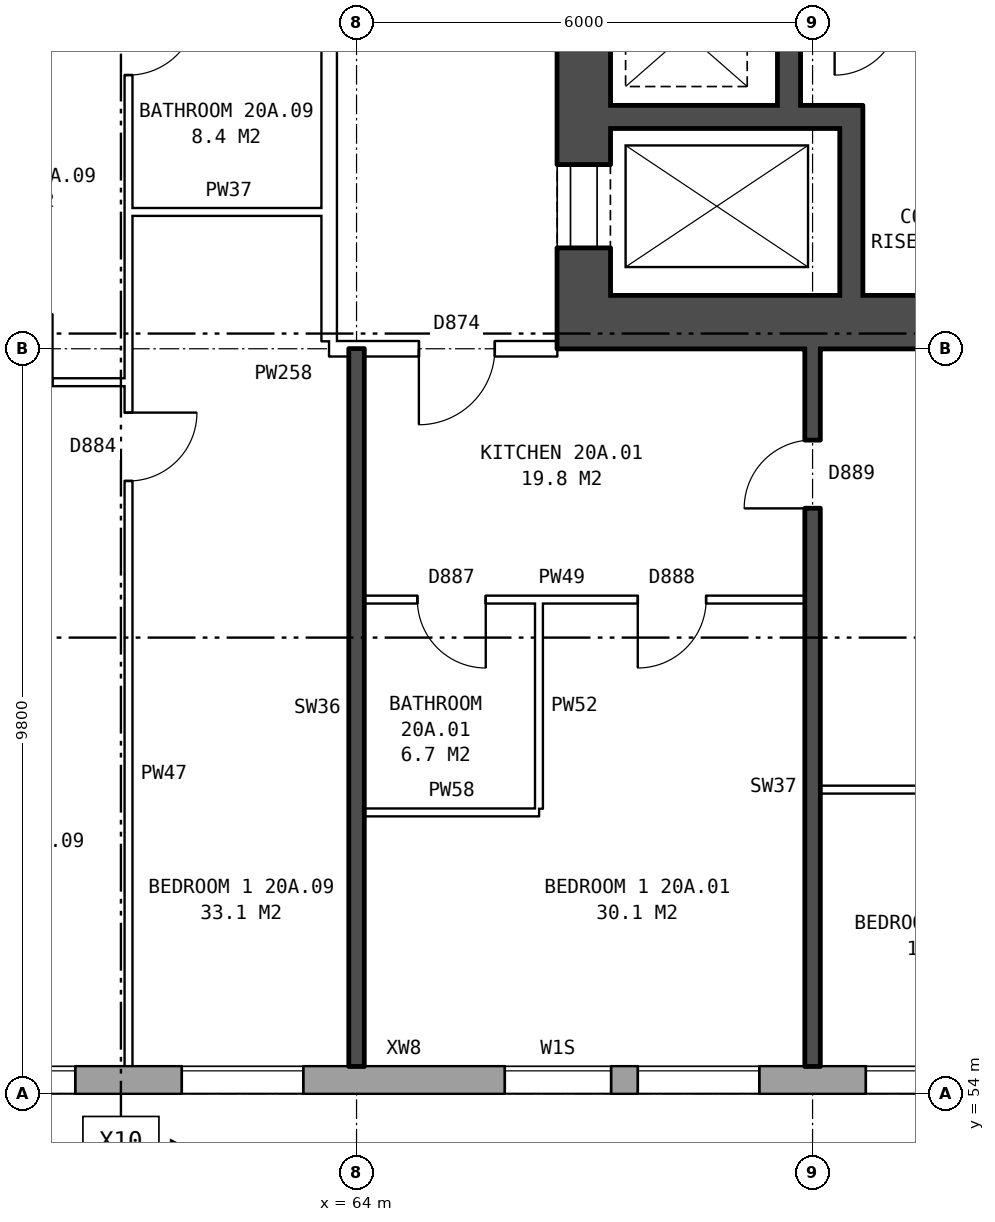
"""IFC4 building model, lengths in metres.
Left out: names, types, materials, properties, quantities, classifications, styles, units other than length and angle.
Written with IfcOpenShell. Run it as: python <this file> out.ifc"""

import sys

from ifc_helpers import new_model, si_unit, direction, frame, frame_2d, origin, place, context, subcontext, project, spatial, rectangle, extrude, element, fill, save


model = new_model("IFC4")
c1 = context("Model", 3, precision=1e-05, world=origin(), true_north=direction((0.0, 1.0)))
c2 = subcontext(c1, "Body", "Model", "MODEL_VIEW")
j1 = project(units=[si_unit("LENGTHUNIT", "METRE"), si_unit("PLANEANGLEUNIT", "RADIAN")], contexts=[c1])
p1 = place(None, origin())
s1 = spatial("IfcSite", under=j1, at=p1, CompositionType="ELEMENT")
p2 = place(p1, origin())
s2 = spatial("IfcBuilding", under=s1, at=p2, CompositionType="ELEMENT")
p3 = place(p2, frame((0.0, 0.0, 74.7)))
s3 = spatial("IfcBuildingStorey", under=s2, at=p3, CompositionType="ELEMENT", Elevation=74.7)
p4 = place(p3, frame((26.325, 54.18, 0.0), z_axis=(0.0, 0.0, 1.0), x_axis=(1.0, 0.0, 0.0)))
e1 = element("IfcWall", 1, at=p4, inside=s3, PredefinedType="STANDARD", context=c2, shape_type="SweptSolid", body=[
    extrude(rectangle(XDim=46.601, YDim=0.36, at=frame_2d((23.3, 0.0))), origin(), (0.0, 0.0, 1.0), 2.85),
])
p5 = place(p4, frame((2.375, 0.0, 0.8)))
e2 = element("IfcOpeningElement", 2, at=p5, cuts=e1, PredefinedType="OPENING", context=c2, shape_type="SweptSolid", body=[
    extrude(rectangle(XDim=1.6, YDim=1.8, at=frame_2d((0.8, 0.9))), frame((0.0, 0.19, 0.0), z_axis=(0.0, -1.0, 0.0), x_axis=(1.0, 0.0, 0.0)), (0.0, 0.0, 1.0), 0.38),
])
p6 = place(p4, frame((4.275, 0.0, 0.8)))
e3 = element("IfcOpeningElement", 3, at=p6, cuts=e1, PredefinedType="OPENING", context=c2, shape_type="SweptSolid", body=[
    extrude(rectangle(XDim=1.6, YDim=1.8, at=frame_2d((0.8, 0.9))), frame((0.0, 0.19, 0.0), z_axis=(0.0, -1.0, 0.0), x_axis=(1.0, 0.0, 0.0)), (0.0, 0.0, 1.0), 0.38),
])
p7 = place(p4, frame((8.275, 0.0, 0.8)))
e4 = element("IfcOpeningElement", 4, at=p7, cuts=e1, PredefinedType="OPENING", context=c2, shape_type="SweptSolid", body=[
    extrude(rectangle(XDim=0.8, YDim=0.9, at=frame_2d((0.4, 0.45))), frame((0.0, 0.19, 0.0), z_axis=(0.0, -1.0, 0.0), x_axis=(1.0, 0.0, 0.0)), (0.0, 0.0, 1.0), 0.38),
])
p8 = place(p4, frame((11.375, 0.0, 0.8)))
e5 = element("IfcOpeningElement", 5, at=p8, cuts=e1, PredefinedType="OPENING", context=c2, shape_type="SweptSolid", body=[
    extrude(rectangle(XDim=1.6, YDim=1.8, at=frame_2d((0.8, 0.9))), frame((0.0, 0.19, 0.0), z_axis=(0.0, -1.0, 0.0), x_axis=(1.0, 0.0, 0.0)), (0.0, 0.0, 1.0), 0.38),
])
p9 = place(p4, frame((14.375, 0.0, 0.8)))
e6 = element("IfcOpeningElement", 6, at=p9, cuts=e1, PredefinedType="OPENING", context=c2, shape_type="SweptSolid", body=[
    extrude(rectangle(XDim=1.6, YDim=1.8, at=frame_2d((0.8, 0.9))), frame((0.0, 0.19, 0.0), z_axis=(0.0, -1.0, 0.0), x_axis=(1.0, 0.0, 0.0)), (0.0, 0.0, 1.0), 0.38),
])
p10 = place(p4, frame((17.375, 0.0, 0.8)))
e7 = element("IfcOpeningElement", 7, at=p10, cuts=e1, PredefinedType="OPENING", context=c2, shape_type="SweptSolid", body=[
    extrude(rectangle(XDim=1.6, YDim=1.8, at=frame_2d((0.8, 0.9))), frame((0.0, 0.19, 0.0), z_axis=(0.0, -1.0, 0.0), x_axis=(1.0, 0.0, 0.0)), (0.0, 0.0, 1.0), 0.38),
])
p11 = place(p4, frame((20.375, 0.0, 0.8)))
e8 = element("IfcOpeningElement", 8, at=p11, cuts=e1, PredefinedType="OPENING", context=c2, shape_type="SweptSolid", body=[
    extrude(rectangle(XDim=1.6, YDim=1.8, at=frame_2d((0.8, 0.9))), frame((0.0, 0.19, 0.0), z_axis=(0.0, -1.0, 0.0), x_axis=(1.0, 0.0, 0.0)), (0.0, 0.0, 1.0), 0.38),
])
p12 = place(p4, frame((23.375, 0.0, 0.8)))
e9 = element("IfcOpeningElement", 9, at=p12, cuts=e1, PredefinedType="OPENING", context=c2, shape_type="SweptSolid", body=[
    extrude(rectangle(XDim=1.6, YDim=1.8, at=frame_2d((0.8, 0.9))), frame((0.0, 0.19, 0.0), z_axis=(0.0, -1.0, 0.0), x_axis=(1.0, 0.0, 0.0)), (0.0, 0.0, 1.0), 0.38),
])
p13 = place(p4, frame((26.375, 0.0, 0.8)))
e10 = element("IfcOpeningElement", 10, at=p13, cuts=e1, PredefinedType="OPENING", context=c2, shape_type="SweptSolid", body=[
    extrude(rectangle(XDim=1.6, YDim=1.8, at=frame_2d((0.8, 0.9))), frame((0.0, 0.19, 0.0), z_axis=(0.0, -1.0, 0.0), x_axis=(1.0, 0.0, 0.0)), (0.0, 0.0, 1.0), 0.38),
])
p14 = place(p4, frame((29.375, 0.0, 0.8)))
e11 = element("IfcOpeningElement", 11, at=p14, cuts=e1, PredefinedType="OPENING", context=c2, shape_type="SweptSolid", body=[
    extrude(rectangle(XDim=1.6, YDim=1.8, at=frame_2d((0.8, 0.9))), frame((0.0, 0.19, 0.0), z_axis=(0.0, -1.0, 0.0), x_axis=(1.0, 0.0, 0.0)), (0.0, 0.0, 1.0), 0.38),
])
p15 = place(p4, frame((32.375, 0.0, 0.8)))
e12 = element("IfcOpeningElement", 12, at=p15, cuts=e1, PredefinedType="OPENING", context=c2, shape_type="SweptSolid", body=[
    extrude(rectangle(XDim=1.6, YDim=1.8, at=frame_2d((0.8, 0.9))), frame((0.0, 0.19, 0.0), z_axis=(0.0, -1.0, 0.0), x_axis=(1.0, 0.0, 0.0)), (0.0, 0.0, 1.0), 0.38),
])
p16 = place(p4, frame((35.375, 0.0, 0.8)))
e13 = element("IfcOpeningElement", 13, at=p16, cuts=e1, PredefinedType="OPENING", context=c2, shape_type="SweptSolid", body=[
    extrude(rectangle(XDim=1.6, YDim=1.8, at=frame_2d((0.8, 0.9))), frame((0.0, 0.19, 0.0), z_axis=(0.0, -1.0, 0.0), x_axis=(1.0, 0.0, 0.0)), (0.0, 0.0, 1.0), 0.38),
])
p17 = place(p4, frame((39.625, 0.0, 1.7)))
e14 = element("IfcOpeningElement", 14, at=p17, cuts=e1, PredefinedType="OPENING", context=c2, shape_type="SweptSolid", body=[
    extrude(rectangle(XDim=1.4, YDim=0.9, at=frame_2d((0.7, 0.45))), frame((0.0, 0.19, 0.0), z_axis=(0.0, -1.0, 0.0), x_axis=(1.0, 0.0, 0.0)), (0.0, 0.0, 1.0), 0.38),
])
p18 = place(p4, frame((41.375, 0.0, 0.8)))
e15 = element("IfcOpeningElement", 15, at=p18, cuts=e1, PredefinedType="OPENING", context=c2, shape_type="SweptSolid", body=[
    extrude(rectangle(XDim=1.6, YDim=1.8, at=frame_2d((0.8, 0.9))), frame((0.0, 0.19, 0.0), z_axis=(0.0, -1.0, 0.0), x_axis=(1.0, 0.0, 0.0)), (0.0, 0.0, 1.0), 0.38),
])
p19 = place(p4, frame((44.375, 0.0, 0.8)))
e16 = element("IfcOpeningElement", 16, at=p19, cuts=e1, PredefinedType="OPENING", context=c2, shape_type="SweptSolid", body=[
    extrude(rectangle(XDim=1.6, YDim=1.8, at=frame_2d((0.8, 0.9))), frame((0.0, 0.19, 0.0), z_axis=(0.0, -1.0, 0.0), x_axis=(1.0, 0.0, 0.0)), (0.0, 0.0, 1.0), 0.38),
])
p20 = place(p4, frame((6.175, 0.0, 1.7)))
e17 = element("IfcOpeningElement", 17, at=p20, cuts=e1, PredefinedType="OPENING", context=c2, shape_type="SweptSolid", body=[
    extrude(rectangle(XDim=0.8, YDim=0.9, at=frame_2d((0.4, 0.45))), frame((0.0, 0.19, 0.0), z_axis=(0.0, -1.0, 0.0), x_axis=(1.0, 0.0, 0.0)), (0.0, 0.0, 1.0), 0.38),
])
p21 = place(p4, frame((9.375, 0.0, 0.8)))
e18 = element("IfcOpeningElement", 18, at=p21, cuts=e1, PredefinedType="OPENING", context=c2, shape_type="SweptSolid", body=[
    extrude(rectangle(XDim=1.0, YDim=1.8, at=frame_2d((0.5, 0.9))), frame((0.0, 0.19, 0.0), z_axis=(0.0, -1.0, 0.0), x_axis=(1.0, 0.0, 0.0)), (0.0, 0.0, 1.0), 0.38),
])
p22 = place(p3, frame((66.99, 64.5, 0.0), z_axis=(0.0, 0.0, 1.0), x_axis=(0.0, 1.0, 0.0)))
e19 = element("IfcWall", 19, at=p22, inside=s3, PredefinedType="SHEAR", context=c2, shape_type="SweptSolid", body=[
    extrude(rectangle(XDim=11.0, YDim=0.7, at=frame_2d((5.5, 0.0))), origin(), (0.0, 0.0, 1.0), 2.85),
])
p23 = place(p22, frame((0.625, 0.0, 0.0)))
e20 = element("IfcOpeningElement", 20, at=p23, cuts=e19, PredefinedType="OPENING", context=c2, shape_type="SweptSolid", body=[
    extrude(rectangle(XDim=1.1, YDim=2.1, at=frame_2d((0.55, 1.05))), frame((0.0, 0.36, 0.0), z_axis=(0.0, -1.0, 0.0), x_axis=(1.0, 0.0, 0.0)), (0.0, 0.0, 1.0), 0.72),
])
p24 = place(p22, frame((9.2, 0.0, 0.0)))
e21 = element("IfcOpeningElement", 21, at=p24, cuts=e19, PredefinedType="OPENING", context=c2, shape_type="SweptSolid", body=[
    extrude(rectangle(XDim=1.1, YDim=2.1, at=frame_2d((0.55, 1.05))), frame((0.0, 0.36, 0.0), z_axis=(0.0, -1.0, 0.0), x_axis=(1.0, 0.0, 0.0)), (0.0, 0.0, 1.0), 0.72),
])
p25 = place(p3, frame((66.64, 64.15, 0.0), z_axis=(0.0, 0.0, 1.0), x_axis=(1.0, 0.0, 0.0)))
e22 = element("IfcWall", 22, at=p25, inside=s3, PredefinedType="SHEAR", context=c2, shape_type="SweptSolid", body=[
    extrude(rectangle(XDim=9.0, YDim=0.7, at=frame_2d((4.5, 0.0))), origin(), (0.0, 0.0, 1.0), 2.85),
])
p26 = place(p3, frame((67.34, 66.85, 0.0), z_axis=(0.0, 0.0, 1.0), x_axis=(1.0, 0.0, 0.0)))
e23 = element("IfcWall", 23, at=p26, inside=s3, PredefinedType="SHEAR", context=c2, shape_type="SweptSolid", body=[
    extrude(rectangle(XDim=3.32, YDim=0.3, at=frame_2d((1.66, 0.0))), origin(), (0.0, 0.0, 1.0), 2.85),
])
p27 = place(p3, frame((69.69, 67.0, 0.0), z_axis=(0.0, 0.0, 1.0), x_axis=(0.0, 1.0, 0.0)))
e24 = element("IfcWall", 24, at=p27, inside=s3, PredefinedType="SHEAR", context=c2, shape_type="SweptSolid", body=[
    extrude(rectangle(XDim=6.6, YDim=0.3, at=frame_2d((3.3, 0.0))), origin(), (0.0, 0.0, 1.0), 2.85),
])
p28 = place(p3, frame((70.51, 64.5, 0.0), z_axis=(0.0, 0.0, 1.0), x_axis=(0.0, 1.0, 0.0)))
e25 = element("IfcWall", 25, at=p28, inside=s3, PredefinedType="SHEAR", context=c2, shape_type="SweptSolid", body=[
    extrude(rectangle(XDim=2.2, YDim=0.3, at=frame_2d((1.1, 0.0))), origin(), (0.0, 0.0, 1.0), 2.85),
])
p29 = place(p3, frame((63.64, 63.9, 0.0), z_axis=(0.0, 0.0, 1.0), x_axis=(0.0, 1.0, 0.0)))
e26 = element("IfcWall", 26, at=p29, inside=s3, PredefinedType="PARTITIONING", context=c2, shape_type="SweptSolid", body=[
    extrude(rectangle(XDim=12.2, YDim=0.2, at=frame_2d((6.1, 0.0))), origin(), (0.0, 0.0, 1.0), 2.85),
])
p30 = place(p29, frame((5.1, 0.0, 0.0)))
e27 = element("IfcOpeningElement", 27, at=p30, cuts=e26, PredefinedType="OPENING", context=c2, shape_type="SweptSolid", body=[
    extrude(rectangle(XDim=2.0, YDim=2.1, at=frame_2d((1.0, 1.05))), frame((0.0, 0.11, 0.0), z_axis=(0.0, -1.0, 0.0), x_axis=(1.0, 0.0, 0.0)), (0.0, 0.0, 1.0), 0.22),
])
p31 = place(p3, frame((64.1, 57.7, 0.0), z_axis=(0.0, 0.0, 1.0), x_axis=(1.0, 0.0, 0.0)))
e28 = element("IfcWall", 28, at=p31, inside=s3, PredefinedType="PARTITIONING", context=c2, shape_type="SweptSolid", body=[
    extrude(rectangle(XDim=2.3, YDim=0.1, at=frame_2d((1.15, 0.0))), origin(), (0.0, 0.0, 1.0), 2.85),
])
p32 = place(p3, frame((70.1, 58.0, 0.0), z_axis=(0.0, 0.0, 1.0), x_axis=(1.0, 0.0, 0.0)))
e29 = element("IfcWall", 29, at=p32, inside=s3, PredefinedType="PARTITIONING", context=c2, shape_type="SweptSolid", body=[
    extrude(rectangle(XDim=5.54, YDim=0.1, at=frame_2d((2.77, 0.0))), origin(), (0.0, 0.0, 1.0), 2.85),
])
p33 = place(p32, frame((2.32, 0.0, 0.0)))
e30 = element("IfcOpeningElement", 30, at=p33, cuts=e29, PredefinedType="OPENING", context=c2, shape_type="SweptSolid", body=[
    extrude(rectangle(XDim=0.9, YDim=2.1, at=frame_2d((0.45, 1.05))), frame((0.0, 0.06, 0.0), z_axis=(0.0, -1.0, 0.0), x_axis=(1.0, 0.0, 0.0)), (0.0, 0.0, 1.0), 0.12),
])
p34 = place(p3, frame((64.1, 60.5, 0.0), z_axis=(0.0, 0.0, 1.0), x_axis=(1.0, 0.0, 0.0)))
e31 = element("IfcWall", 31, at=p34, inside=s3, PredefinedType="PARTITIONING", context=c2, shape_type="SweptSolid", body=[
    extrude(rectangle(XDim=5.8, YDim=0.1, at=frame_2d((2.9, 0.0))), origin(), (0.0, 0.0, 1.0), 2.85),
])
p35 = place(p34, frame((3.6, 0.0, 0.0)))
e32 = element("IfcOpeningElement", 32, at=p35, cuts=e31, PredefinedType="OPENING", context=c2, shape_type="SweptSolid", body=[
    extrude(rectangle(XDim=0.9, YDim=2.1, at=frame_2d((0.45, 1.05))), frame((0.0, 0.06, 0.0), z_axis=(0.0, -1.0, 0.0), x_axis=(1.0, 0.0, 0.0)), (0.0, 0.0, 1.0), 0.12),
])
p36 = place(p34, frame((0.7, 0.0, 0.0)))
e33 = element("IfcOpeningElement", 33, at=p36, cuts=e31, PredefinedType="OPENING", context=c2, shape_type="SweptSolid", body=[
    extrude(rectangle(XDim=0.9, YDim=2.1, at=frame_2d((0.45, 1.05))), frame((0.0, 0.06, 0.0), z_axis=(0.0, -1.0, 0.0), x_axis=(1.0, 0.0, 0.0)), (0.0, 0.0, 1.0), 0.12),
])
p37 = place(p3, frame((58.1, 63.36, 0.0), z_axis=(0.0, 0.0, 1.0), x_axis=(1.0, 0.0, 0.0)))
e34 = element("IfcWall", 34, at=p37, inside=s3, PredefinedType="PARTITIONING", context=c2, shape_type="SweptSolid", body=[
    extrude(rectangle(XDim=2.9, YDim=0.1, at=frame_2d((1.45, 0.0))), origin(), (0.0, 0.0, 1.0), 2.85),
])
p38 = place(p37, frame((1.0, 0.0, 0.0)))
e35 = element("IfcOpeningElement", 35, at=p38, cuts=e34, PredefinedType="OPENING", context=c2, shape_type="SweptSolid", body=[
    extrude(rectangle(XDim=0.9, YDim=2.1, at=frame_2d((0.45, 1.05))), frame((0.0, 0.06, 0.0), z_axis=(0.0, -1.0, 0.0), x_axis=(1.0, 0.0, 0.0)), (0.0, 0.0, 1.0), 0.12),
])
p39 = place(p3, frame((63.64, 63.8, 0.0), z_axis=(0.0, 0.0, 1.0), x_axis=(1.0, 0.0, 0.0)))
e36 = element("IfcWall", 36, at=p39, inside=s3, PredefinedType="PARTITIONING", context=c2, shape_type="SweptSolid", body=[
    extrude(rectangle(XDim=3.0, YDim=0.2, at=frame_2d((1.5, 0.0))), origin(), (0.0, 0.0, 1.0), 2.85),
])
p40 = place(p39, frame((1.18, 0.0, 0.0)))
e37 = element("IfcOpeningElement", 37, at=p40, cuts=e36, PredefinedType="OPENING", context=c2, shape_type="SweptSolid", body=[
    extrude(rectangle(XDim=1.0, YDim=2.1, at=frame_2d((0.5, 1.05))), frame((0.0, 0.11, 0.0), z_axis=(0.0, -1.0, 0.0), x_axis=(1.0, 0.0, 0.0)), (0.0, 0.0, 1.0), 0.22),
])
p41 = place(p3, frame((61.0, 65.6, 0.0), z_axis=(0.0, 0.0, 1.0), x_axis=(1.0, 0.0, 0.0)))
e38 = element("IfcWall", 38, at=p41, inside=s3, PredefinedType="PARTITIONING", context=c2, shape_type="SweptSolid", body=[
    extrude(rectangle(XDim=2.64, YDim=0.1, at=frame_2d((1.32, 0.0))), origin(), (0.0, 0.0, 1.0), 2.85),
])
p42 = place(p3, frame((61.0, 54.36, 0.0), z_axis=(0.0, 0.0, 1.0), x_axis=(0.0, 1.0, 0.0)))
e39 = element("IfcWall", 39, at=p42, inside=s3, PredefinedType="PARTITIONING", context=c2, shape_type="SweptSolid", body=[
    extrude(rectangle(XDim=14.34, YDim=0.1, at=frame_2d((7.17, 0.0))), origin(), (0.0, 0.0, 1.0), 2.85),
])
p43 = place(p42, frame((7.7, 0.0, 0.0)))
e40 = element("IfcOpeningElement", 40, at=p43, cuts=e39, PredefinedType="OPENING", context=c2, shape_type="SweptSolid", body=[
    extrude(rectangle(XDim=0.9, YDim=2.1, at=frame_2d((0.45, 1.05))), frame((0.0, 0.06, 0.0), z_axis=(0.0, -1.0, 0.0), x_axis=(1.0, 0.0, 0.0)), (0.0, 0.0, 1.0), 0.12),
])
p44 = place(p42, frame((13.04, 0.0, 0.0)))
e41 = element("IfcOpeningElement", 41, at=p44, cuts=e39, PredefinedType="OPENING", context=c2, shape_type="SweptSolid", body=[
    extrude(rectangle(XDim=0.9, YDim=2.1, at=frame_2d((0.45, 1.05))), frame((0.0, 0.06, 0.0), z_axis=(0.0, -1.0, 0.0), x_axis=(1.0, 0.0, 0.0)), (0.0, 0.0, 1.0), 0.12),
])
p45 = place(p3, frame((64.0, 54.36, 0.0), z_axis=(0.0, 0.0, 1.0), x_axis=(0.0, 1.0, 0.0)))
e42 = element("IfcWall", 42, at=p45, inside=s3, PredefinedType="SOLIDWALL", context=c2, shape_type="SweptSolid", body=[
    extrude(rectangle(XDim=9.44, YDim=0.2, at=frame_2d((4.72, 0.0))), origin(), (0.0, 0.0, 1.0), 2.85),
])
p46 = place(p3, frame((66.4, 57.75, 0.0), z_axis=(0.0, 0.0, 1.0), x_axis=(0.0, 1.0, 0.0)))
e43 = element("IfcWall", 43, at=p46, inside=s3, PredefinedType="PARTITIONING", context=c2, shape_type="SweptSolid", body=[
    extrude(rectangle(XDim=2.7, YDim=0.1, at=frame_2d((1.35, 0.0))), origin(), (0.0, 0.0, 1.0), 2.85),
])
p47 = place(p3, frame((70.0, 54.36, 0.0), z_axis=(0.0, 0.0, 1.0), x_axis=(0.0, 1.0, 0.0)))
e44 = element("IfcWall", 44, at=p47, inside=s3, PredefinedType="SOLIDWALL", context=c2, shape_type="SweptSolid", body=[
    extrude(rectangle(XDim=9.44, YDim=0.2, at=frame_2d((4.72, 0.0))), origin(), (0.0, 0.0, 1.0), 2.85),
])
p48 = place(p47, frame((7.34, 0.0, 0.0)))
e45 = element("IfcOpeningElement", 45, at=p48, cuts=e44, PredefinedType="OPENING", context=c2, shape_type="SweptSolid", body=[
    extrude(rectangle(XDim=0.9, YDim=2.1, at=frame_2d((0.45, 1.05))), frame((0.0, 0.11, 0.0), z_axis=(0.0, -1.0, 0.0), x_axis=(1.0, 0.0, 0.0)), (0.0, 0.0, 1.0), 0.22),
])
p49 = place(p15, origin())
e46 = element("IfcWindow", 46, at=p49, inside=s3, PartitioningType="SINGLE_PANEL", PredefinedType="WINDOW", context=c2, shape_type="SweptSolid", body=[
    extrude(rectangle(XDim=1.6, YDim=1.8, at=frame_2d((0.8, 0.9))), frame((0.0, 0.15, 0.0), z_axis=(0.0, -1.0, 0.0), x_axis=(1.0, 0.0, 0.0)), (0.0, 0.0, 1.0), 0.06),
])
fill(e12, e46)
p50 = place(p16, origin())
e47 = element("IfcWindow", 47, at=p50, inside=s3, PartitioningType="SINGLE_PANEL", PredefinedType="WINDOW", context=c2, shape_type="SweptSolid", body=[
    extrude(rectangle(XDim=1.6, YDim=1.8, at=frame_2d((0.8, 0.9))), frame((0.0, 0.15, 0.0), z_axis=(0.0, -1.0, 0.0), x_axis=(1.0, 0.0, 0.0)), (0.0, 0.0, 1.0), 0.06),
])
fill(e13, e47)
p51 = place(p17, origin())
e48 = element("IfcWindow", 48, at=p51, inside=s3, PartitioningType="SINGLE_PANEL", PredefinedType="WINDOW", context=c2, shape_type="SweptSolid", body=[
    extrude(rectangle(XDim=1.4, YDim=0.9, at=frame_2d((0.7, 0.45))), frame((0.0, 0.15, 0.0), z_axis=(0.0, -1.0, 0.0), x_axis=(1.0, 0.0, 0.0)), (0.0, 0.0, 1.0), 0.06),
])
fill(e14, e48)
p52 = place(p18, origin())
e49 = element("IfcWindow", 49, at=p52, inside=s3, PartitioningType="SINGLE_PANEL", PredefinedType="WINDOW", context=c2, shape_type="SweptSolid", body=[
    extrude(rectangle(XDim=1.6, YDim=1.8, at=frame_2d((0.8, 0.9))), frame((0.0, 0.15, 0.0), z_axis=(0.0, -1.0, 0.0), x_axis=(1.0, 0.0, 0.0)), (0.0, 0.0, 1.0), 0.06),
])
fill(e15, e49)
p53 = place(p19, origin())
e50 = element("IfcWindow", 50, at=p53, inside=s3, PartitioningType="SINGLE_PANEL", PredefinedType="WINDOW", context=c2, shape_type="SweptSolid", body=[
    extrude(rectangle(XDim=1.6, YDim=1.8, at=frame_2d((0.8, 0.9))), frame((0.0, 0.15, 0.0), z_axis=(0.0, -1.0, 0.0), x_axis=(1.0, 0.0, 0.0)), (0.0, 0.0, 1.0), 0.06),
])
fill(e16, e50)
p54 = place(p23, origin())
e51 = element("IfcDoor", 51, at=p54, inside=s3, OperationType="DOUBLE_DOOR_SLIDING", PredefinedType="DOOR", context=c2, shape_type="SweptSolid", body=[
    extrude(rectangle(XDim=1.1, YDim=2.1, at=frame_2d((0.55, 1.05))), frame((0.0, -0.285, 0.0), z_axis=(0.0, -1.0, 0.0), x_axis=(1.0, 0.0, 0.0)), (0.0, 0.0, 1.0), 0.05),
])
fill(e20, e51)
p55 = place(p35, frame((0.9, 0.0, 0.0), z_axis=(0.0, 0.0, 1.0), x_axis=(-1.0, 0.0, 0.0)))
e52 = element("IfcDoor", 52, at=p55, inside=s3, OperationType="SINGLE_SWING_RIGHT", PredefinedType="DOOR", context=c2, shape_type="SweptSolid", body=[
    extrude(rectangle(XDim=0.9, YDim=2.1, at=frame_2d((0.45, 1.05))), frame((0.0, 0.025, 0.0), z_axis=(0.0, -1.0, 0.0), x_axis=(1.0, 0.0, 0.0)), (0.0, 0.0, 1.0), 0.05),
])
fill(e32, e52)
p56 = place(p40, frame((1.0, 0.0, 0.0), z_axis=(0.0, 0.0, 1.0), x_axis=(-1.0, 0.0, 0.0)))
e53 = element("IfcDoor", 53, at=p56, inside=s3, OperationType="SINGLE_SWING_RIGHT", PredefinedType="DOOR", context=c2, shape_type="SweptSolid", body=[
    extrude(rectangle(XDim=1.0, YDim=2.1, at=frame_2d((0.5, 1.05))), frame((0.0, 0.025, 0.0), z_axis=(0.0, -1.0, 0.0), x_axis=(1.0, 0.0, 0.0)), (0.0, 0.0, 1.0), 0.05),
])
fill(e37, e53)
p57 = place(p48, origin())
e54 = element("IfcDoor", 54, at=p57, inside=s3, OperationType="SINGLE_SWING_LEFT", PredefinedType="DOOR", context=c2, shape_type="SweptSolid", body=[
    extrude(rectangle(XDim=0.9, YDim=2.1, at=frame_2d((0.45, 1.05))), frame((0.0, 0.025, 0.0), z_axis=(0.0, -1.0, 0.0), x_axis=(1.0, 0.0, 0.0)), (0.0, 0.0, 1.0), 0.05),
])
fill(e45, e54)
p58 = place(p36, frame((0.9, 0.0, 0.0), z_axis=(0.0, 0.0, 1.0), x_axis=(-1.0, 0.0, 0.0)))
e55 = element("IfcDoor", 55, at=p58, inside=s3, OperationType="SINGLE_SWING_LEFT", PredefinedType="DOOR", context=c2, shape_type="SweptSolid", body=[
    extrude(rectangle(XDim=0.9, YDim=2.1, at=frame_2d((0.45, 1.05))), frame((0.0, 0.025, 0.0), z_axis=(0.0, -1.0, 0.0), x_axis=(1.0, 0.0, 0.0)), (0.0, 0.0, 1.0), 0.05),
])
fill(e33, e55)
p59 = place(p43, frame((0.9, 0.0, 0.0), z_axis=(0.0, 0.0, 1.0), x_axis=(-1.0, 0.0, 0.0)))
e56 = element("IfcDoor", 56, at=p59, inside=s3, OperationType="SINGLE_SWING_LEFT", PredefinedType="DOOR", context=c2, shape_type="SweptSolid", body=[
    extrude(rectangle(XDim=0.9, YDim=2.1, at=frame_2d((0.45, 1.05))), frame((0.0, 0.025, 0.0), z_axis=(0.0, -1.0, 0.0), x_axis=(1.0, 0.0, 0.0)), (0.0, 0.0, 1.0), 0.05),
])
fill(e40, e56)
p60 = place(p44, frame((0.9, 0.0, 0.0), z_axis=(0.0, 0.0, 1.0), x_axis=(-1.0, 0.0, 0.0)))
e57 = element("IfcDoor", 57, at=p60, inside=s3, OperationType="SINGLE_SWING_LEFT", PredefinedType="DOOR", context=c2, shape_type="SweptSolid", body=[
    extrude(rectangle(XDim=0.9, YDim=2.1, at=frame_2d((0.45, 1.05))), frame((0.0, 0.025, 0.0), z_axis=(0.0, -1.0, 0.0), x_axis=(1.0, 0.0, 0.0)), (0.0, 0.0, 1.0), 0.05),
])
fill(e41, e57)
save(model, sys.argv[1])
